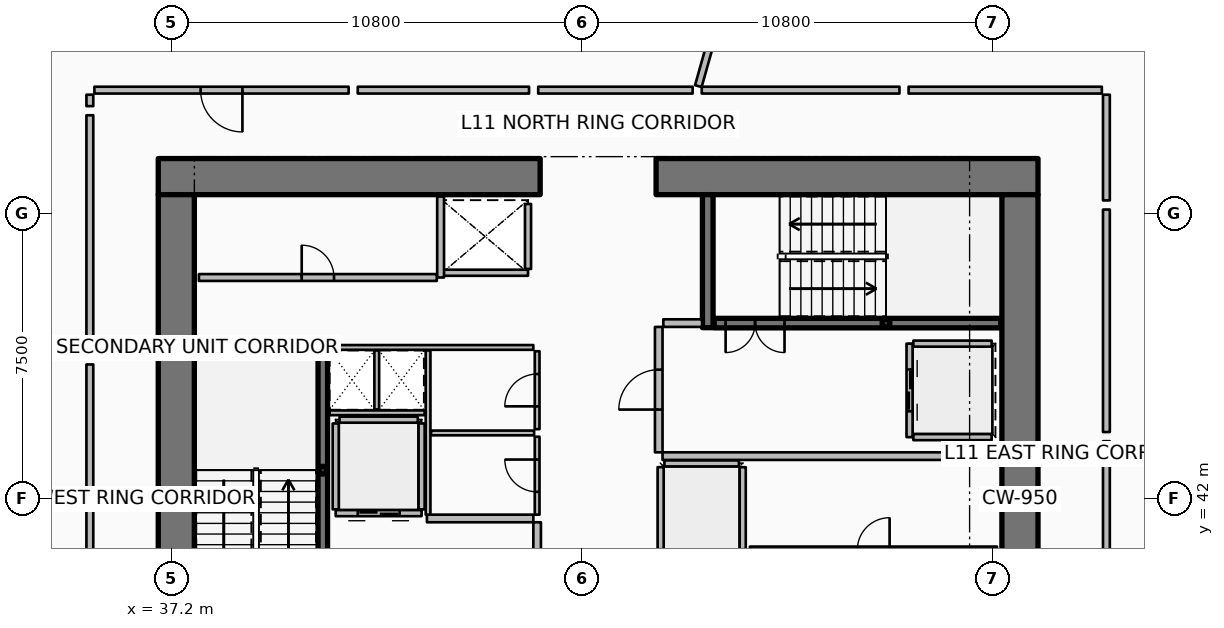
"""IFC4 building model, lengths in metres.
Left out: names, types, materials, properties, quantities, classifications, styles, units other than length and angle.
Written with IfcOpenShell. Run it as: python <this file> out.ifc"""

import sys

from ifc_helpers import new_model, si_unit, direction, frame, frame_2d, origin, origin_2d, place, context, subcontext, project, spatial, rectangle, hollow_rectangle, extrude, element, fill, save


model = new_model("IFC4")
c1 = context("Model", 3, precision=1e-05, world=origin(), true_north=direction((0.0, 1.0)))
c2 = subcontext(c1, "Body", "Model", "MODEL_VIEW")
j1 = project(units=[si_unit("LENGTHUNIT", "METRE"), si_unit("PLANEANGLEUNIT", "RADIAN")], contexts=[c1])
p1 = place(None, origin())
s1 = spatial("IfcSite", under=j1, at=p1, CompositionType="ELEMENT")
p2 = place(p1, origin())
s2 = spatial("IfcBuilding", under=s1, at=p2, CompositionType="ELEMENT")
p3 = place(p2, frame((0.0, 0.0, 48.9)))
s3 = spatial("IfcBuildingStorey", under=s2, at=p3, CompositionType="ELEMENT", Elevation=48.9)
p4 = place(p3, frame((36.85, 50.475, 0.0), z_axis=(0.0, 0.0, 1.0), x_axis=(1.0, 0.0, 0.0)))
e1 = element("IfcWall", 1, at=p4, inside=s3, PredefinedType="SHEAR", context=c2, shape_type="SweptSolid", body=[
    extrude(rectangle(XDim=10.05, YDim=0.95, at=frame_2d((5.025, 0.0))), origin(), (0.0, 0.0, 1.0), 3.75),
])
p5 = place(p3, frame((49.95, 50.475, 0.0), z_axis=(0.0, 0.0, 1.0), x_axis=(1.0, 0.0, 0.0)))
e2 = element("IfcWall", 2, at=p5, inside=s3, PredefinedType="SHEAR", context=c2, shape_type="SweptSolid", body=[
    extrude(rectangle(XDim=10.05, YDim=0.95, at=frame_2d((5.025, 0.0))), origin(), (0.0, 0.0, 1.0), 3.75),
])
for number, where, z_axis, x_axis in (
    (3, (37.325, 34.0, 0.0), (0.0, 0.0, 1.0), (0.0, 1.0, 0.0)),
    (4, (59.525, 34.0, 0.0), (0.0, 0.0, 1.0), (0.0, 1.0, 0.0)),
):
    element("IfcWall", number, at=place(p3, frame(where, z_axis=z_axis, x_axis=x_axis)), inside=s3, PredefinedType="SHEAR", context=c2, shape_type="SweptSolid", body=[
        extrude(rectangle(XDim=16.0, YDim=0.95, at=frame_2d((8.0, 0.0))), origin(), (0.0, 0.0, 1.0), 3.75),
    ])
for number, where, z_axis, x_axis in (
    (5, (37.8, 45.94, 0.0), (0.0, 0.0, 1.0), (1.0, 0.0, 0.0)),
    (6, (51.31, 46.5, 0.0), (0.0, 0.0, 1.0), (0.0, 1.0, 0.0)),
):
    element("IfcWall", number, at=place(p3, frame(where, z_axis=z_axis, x_axis=x_axis)), inside=s3, PredefinedType="SHEAR", context=c2, shape_type="SweptSolid", body=[
        extrude(rectangle(XDim=3.5, YDim=0.28, at=frame_2d((1.75, 0.0))), origin(), (0.0, 0.0, 1.0), 3.75),
    ])
for number, where, z_axis, x_axis in (
    (7, (41.18, 42.75, 0.0), (0.0, 0.0, 1.0), (1.0, 0.0, 0.0)),
    (8, (56.0, 46.62, 0.0), (0.0, 0.0, 1.0), (1.0, 0.0, 0.0)),
):
    element("IfcColumn", number, at=place(p3, frame(where, z_axis=z_axis, x_axis=x_axis)), inside=s3, PredefinedType="COLUMN", context=c2, shape_type="SweptSolid", body=[
        extrude(hollow_rectangle(XDim=0.2, YDim=0.2, WallThickness=0.01, InnerFilletRadius=0.01, OuterFilletRadius=0.02, at=origin_2d()), origin(), (0.0, 0.0, 1.0), 1.67),
    ])
p6 = place(p3, frame((41.18, 38.22, 0.0), z_axis=(0.0, 0.0, 1.0), x_axis=(0.0, 1.0, 0.0)))
e9 = element("IfcWall", 9, at=p6, inside=s3, PredefinedType="SOLIDWALL", context=c2, shape_type="SweptSolid", body=[
    extrude(rectangle(XDim=7.56, YDim=0.25, at=frame_2d((3.78, 0.0))), origin(), (0.0, 0.0, 1.0), 3.5),
])
p7 = place(p6, frame((0.3, 0.0, 0.0)))
e10 = element("IfcOpeningElement", 10, at=p7, cuts=e9, PredefinedType="OPENING", context=c2, shape_type="SweptSolid", body=[
    extrude(rectangle(XDim=1.55, YDim=2.15, at=frame_2d((0.775, 1.075))), frame((0.0, 0.135, 0.0), z_axis=(0.0, -1.0, 0.0), x_axis=(1.0, 0.0, 0.0)), (0.0, 0.0, 1.0), 0.27),
])
p8 = place(p3, frame((51.48, 46.62, 0.0), z_axis=(0.0, 0.0, 1.0), x_axis=(1.0, 0.0, 0.0)))
e11 = element("IfcWall", 11, at=p8, inside=s3, PredefinedType="SOLIDWALL", context=c2, shape_type="SweptSolid", body=[
    extrude(rectangle(XDim=7.54, YDim=0.25, at=frame_2d((3.77, 0.0))), origin(), (0.0, 0.0, 1.0), 3.5),
])
p9 = place(p8, frame((0.3, 0.0, 0.0)))
e12 = element("IfcOpeningElement", 12, at=p9, cuts=e11, PredefinedType="OPENING", context=c2, shape_type="SweptSolid", body=[
    extrude(rectangle(XDim=1.55, YDim=2.15, at=frame_2d((0.775, 1.075))), frame((0.0, 0.135, 0.0), z_axis=(0.0, -1.0, 0.0), x_axis=(1.0, 0.0, 0.0)), (0.0, 0.0, 1.0), 0.27),
])
p10 = place(p3, frame((46.58, 47.945, 0.0), z_axis=(0.0, 0.0, 1.0), x_axis=(-1.0, 0.0, 0.0)))
e13 = element("IfcWall", 13, at=p10, inside=s3, PredefinedType="PARTITIONING", context=c2, shape_type="SweptSolid", body=[
    extrude(rectangle(XDim=2.26, YDim=0.16, at=frame_2d((1.13, 0.0))), origin(), (0.0, 0.0, 1.0), 3.5),
])
p11 = place(p3, frame((46.58, 48.045, 0.0), z_axis=(0.0, 0.0, 1.0), x_axis=(0.0, 1.0, 0.0)))
e14 = element("IfcWall", 14, at=p11, inside=s3, PredefinedType="PARTITIONING", context=c2, shape_type="SweptSolid", body=[
    extrude(rectangle(XDim=1.71, YDim=0.16, at=frame_2d((0.855, 0.0))), origin(), (0.0, 0.0, 1.0), 3.5),
])
p12 = place(p3, frame((43.78, 41.62, 0.0), z_axis=(0.0, 0.0, 1.0), x_axis=(-1.0, 0.0, 0.0)))
e15 = element("IfcWall", 15, at=p12, inside=s3, PredefinedType="PARTITIONING", context=c2, shape_type="SweptSolid", body=[
    extrude(rectangle(XDim=2.26, YDim=0.16, at=frame_2d((1.13, 0.0))), origin(), (0.0, 0.0, 1.0), 3.5),
])
p13 = place(p12, frame((0.58, 0.0, 0.0)))
e16 = element("IfcOpeningElement", 16, at=p13, cuts=e15, PredefinedType="OPENING", context=c2, shape_type="SweptSolid", body=[
    extrude(rectangle(XDim=1.1, YDim=2.1, at=frame_2d((0.55, 1.05))), frame((0.0, 0.09, 0.0), z_axis=(0.0, -1.0, 0.0), x_axis=(1.0, 0.0, 0.0)), (0.0, 0.0, 1.0), 0.18),
])
for number, where, z_axis, x_axis in (
    (17, (43.78, 41.72, 0.0), (0.0, 0.0, 1.0), (0.0, 1.0, 0.0)),
    (18, (41.52, 41.72, 0.0), (0.0, 0.0, 1.0), (0.0, 1.0, 0.0)),
):
    element("IfcWall", number, at=place(p3, frame(where, z_axis=z_axis, x_axis=x_axis)), inside=s3, PredefinedType="PARTITIONING", context=c2, shape_type="SweptSolid", body=[
        extrude(rectangle(XDim=2.26, YDim=0.16, at=frame_2d((1.13, 0.0))), origin(), (0.0, 0.0, 1.0), 3.5),
    ])
p14 = place(p3, frame((41.62, 44.08, 0.0), z_axis=(0.0, 0.0, 1.0), x_axis=(1.0, 0.0, 0.0)))
e19 = element("IfcWall", 19, at=p14, inside=s3, PredefinedType="PARTITIONING", context=c2, shape_type="SweptSolid", body=[
    extrude(rectangle(XDim=2.06, YDim=0.16, at=frame_2d((1.03, 0.0))), origin(), (0.0, 0.0, 1.0), 3.5),
])
p15 = place(p3, frame((56.62, 46.08, 0.0), z_axis=(0.0, 0.0, 1.0), x_axis=(0.0, -1.0, 0.0)))
e20 = element("IfcWall", 20, at=p15, inside=s3, PredefinedType="PARTITIONING", context=c2, shape_type="SweptSolid", body=[
    extrude(rectangle(XDim=2.46, YDim=0.16, at=frame_2d((1.23, 0.0))), origin(), (0.0, 0.0, 1.0), 3.5),
])
p16 = place(p15, frame((0.68, 0.0, 0.0)))
e21 = element("IfcOpeningElement", 21, at=p16, cuts=e20, PredefinedType="OPENING", context=c2, shape_type="SweptSolid", body=[
    extrude(rectangle(XDim=1.1, YDim=2.1, at=frame_2d((0.55, 1.05))), frame((0.0, 0.09, 0.0), z_axis=(0.0, -1.0, 0.0), x_axis=(1.0, 0.0, 0.0)), (0.0, 0.0, 1.0), 0.18),
])
for number, where, z_axis, x_axis in (
    (22, (56.72, 46.08, 0.0), (0.0, 0.0, 1.0), (1.0, 0.0, 0.0)),
    (23, (56.72, 43.62, 0.0), (0.0, 0.0, 1.0), (1.0, 0.0, 0.0)),
):
    element("IfcWall", number, at=place(p3, frame(where, z_axis=z_axis, x_axis=x_axis)), inside=s3, PredefinedType="PARTITIONING", context=c2, shape_type="SweptSolid", body=[
        extrude(rectangle(XDim=2.06, YDim=0.16, at=frame_2d((1.03, 0.0))), origin(), (0.0, 0.0, 1.0), 3.5),
    ])
for number, where, z_axis, x_axis in (
    (24, (52.23, 40.67, 0.0), (0.0, 0.0, 1.0), (0.0, 1.0, 0.0)),
    (25, (50.07, 40.67, 0.0), (0.0, 0.0, 1.0), (0.0, 1.0, 0.0)),
):
    element("IfcWall", number, at=place(p3, frame(where, z_axis=z_axis, x_axis=x_axis)), inside=s3, PredefinedType="PARTITIONING", context=c2, shape_type="SweptSolid", body=[
        extrude(rectangle(XDim=2.16, YDim=0.16, at=frame_2d((1.08, 0.0))), origin(), (0.0, 0.0, 1.0), 3.5),
    ])
p17 = place(p3, frame((50.17, 42.93, 0.0), z_axis=(0.0, 0.0, 1.0), x_axis=(1.0, 0.0, 0.0)))
e26 = element("IfcWall", 26, at=p17, inside=s3, PredefinedType="PARTITIONING", context=c2, shape_type="SweptSolid", body=[
    extrude(rectangle(XDim=1.96, YDim=0.16, at=frame_2d((0.98, 0.0))), origin(), (0.0, 0.0, 1.0), 3.5),
])
p18 = place(p3, frame((37.92, 47.82, 0.0), z_axis=(0.0, 0.0, 1.0), x_axis=(1.0, 0.0, 0.0)))
e27 = element("IfcWall", 27, at=p18, inside=s3, PredefinedType="PARTITIONING", context=c2, shape_type="SweptSolid", body=[
    extrude(rectangle(XDim=6.26, YDim=0.18, at=frame_2d((3.13, 0.0))), origin(), (0.0, 0.0, 1.0), 3.5),
])
p19 = place(p18, frame((2.705, 0.0, 0.0)))
e28 = element("IfcOpeningElement", 28, at=p19, cuts=e27, PredefinedType="OPENING", context=c2, shape_type="SweptSolid", body=[
    extrude(rectangle(XDim=0.85, YDim=2.06, at=frame_2d((0.425, 1.03))), frame((0.0, 0.1, 0.0), z_axis=(0.0, -1.0, 0.0), x_axis=(1.0, 0.0, 0.0)), (0.0, 0.0, 1.0), 0.2),
])
p20 = place(p3, frame((44.28, 47.82, 0.0), z_axis=(0.0, 0.0, 1.0), x_axis=(0.0, 1.0, 0.0)))
e29 = element("IfcWall", 29, at=p20, inside=s3, PredefinedType="PARTITIONING", context=c2, shape_type="SweptSolid", body=[
    extrude(rectangle(XDim=2.13, YDim=0.18, at=frame_2d((1.065, 0.0))), origin(), (0.0, 0.0, 1.0), 3.5),
])
p21 = place(p3, frame((52.42, 40.65, 0.0), z_axis=(0.0, 0.0, 1.0), x_axis=(1.0, 0.0, 0.0)))
e30 = element("IfcWall", 30, at=p21, inside=s3, PredefinedType="PARTITIONING", context=c2, shape_type="SweptSolid", body=[
    extrude(rectangle(XDim=6.5, YDim=0.18, at=frame_2d((3.25, 0.0))), origin(), (0.0, 0.0, 1.0), 3.5),
])
p22 = place(p21, frame((2.825, 0.0, 0.0)))
e31 = element("IfcOpeningElement", 31, at=p22, cuts=e30, PredefinedType="OPENING", context=c2, shape_type="SweptSolid", body=[
    extrude(rectangle(XDim=0.85, YDim=2.06, at=frame_2d((0.425, 1.03))), frame((0.0, 0.1, 0.0), z_axis=(0.0, -1.0, 0.0), x_axis=(1.0, 0.0, 0.0)), (0.0, 0.0, 1.0), 0.2),
])
p23 = place(p3, frame((43.92, 41.48, 0.0), z_axis=(0.0, 0.0, 1.0), x_axis=(1.0, 0.0, 0.0)))
e32 = element("IfcWall", 32, at=p23, inside=s3, PredefinedType="PARTITIONING", context=c2, shape_type="SweptSolid", body=[
    extrude(rectangle(XDim=2.8, YDim=0.2, at=frame_2d((1.4, 0.0))), origin(), (0.0, 0.0, 1.0), 3.5),
])
p24 = place(p3, frame((46.82, 38.12, 0.0), z_axis=(0.0, 0.0, 1.0), x_axis=(0.0, 1.0, 0.0)))
e33 = element("IfcWall", 33, at=p24, inside=s3, PredefinedType="PARTITIONING", context=c2, shape_type="SweptSolid", body=[
    extrude(rectangle(XDim=3.26, YDim=0.2, at=frame_2d((1.63, 0.0))), origin(), (0.0, 0.0, 1.0), 3.5),
])
p25 = place(p24, frame((1.105, 0.0, 0.0)))
e34 = element("IfcOpeningElement", 34, at=p25, cuts=e33, PredefinedType="OPENING", context=c2, shape_type="SweptSolid", body=[
    extrude(rectangle(XDim=1.05, YDim=2.1, at=frame_2d((0.525, 1.05))), frame((0.0, 0.11, 0.0), z_axis=(0.0, -1.0, 0.0), x_axis=(1.0, 0.0, 0.0)), (0.0, 0.0, 1.0), 0.22),
])
p26 = place(p3, frame((50.12, 43.12, 0.0), z_axis=(0.0, 0.0, 1.0), x_axis=(1.0, 0.0, 0.0)))
e35 = element("IfcWall", 35, at=p26, inside=s3, PredefinedType="PARTITIONING", context=c2, shape_type="SweptSolid", body=[
    extrude(rectangle(XDim=8.88, YDim=0.2, at=frame_2d((4.44, 0.0))), origin(), (0.0, 0.0, 1.0), 3.5),
])
p27 = place(p3, frame((50.14, 46.62, 0.0), z_axis=(0.0, 0.0, 1.0), x_axis=(1.0, 0.0, 0.0)))
e36 = element("IfcWall", 36, at=p27, inside=s3, PredefinedType="PARTITIONING", context=c2, shape_type="SweptSolid", body=[
    extrude(rectangle(XDim=1.02, YDim=0.2, at=frame_2d((0.51, 0.0))), origin(), (0.0, 0.0, 1.0), 3.5),
])
p28 = place(p3, frame((50.02, 43.22, 0.0), z_axis=(0.0, 0.0, 1.0), x_axis=(0.0, 1.0, 0.0)))
e37 = element("IfcWall", 37, at=p28, inside=s3, PredefinedType="PARTITIONING", context=c2, shape_type="SweptSolid", body=[
    extrude(rectangle(XDim=3.3, YDim=0.2, at=frame_2d((1.65, 0.0))), origin(), (0.0, 0.0, 1.0), 3.5),
])
p29 = place(p28, frame((1.125, 0.0, 0.0)))
e38 = element("IfcOpeningElement", 38, at=p29, cuts=e37, PredefinedType="OPENING", context=c2, shape_type="SweptSolid", body=[
    extrude(rectangle(XDim=1.05, YDim=2.1, at=frame_2d((0.525, 1.05))), frame((0.0, 0.11, 0.0), z_axis=(0.0, -1.0, 0.0), x_axis=(1.0, 0.0, 0.0)), (0.0, 0.0, 1.0), 0.22),
])
p30 = place(p3, frame((41.36, 45.98, 0.0), z_axis=(0.0, 0.0, 1.0), x_axis=(1.0, 0.0, 0.0)))
e39 = element("IfcWall", 39, at=p30, inside=s3, PredefinedType="PARTITIONING", context=c2, shape_type="SweptSolid", body=[
    extrude(rectangle(XDim=5.36, YDim=0.125, at=frame_2d((2.68, 0.0))), origin(), (0.0, 0.0, 1.0), 2.94),
])
p31 = place(p3, frame((41.36, 44.26, 0.0), z_axis=(0.0, 0.0, 1.0), x_axis=(1.0, 0.0, 0.0)))
e40 = element("IfcWall", 40, at=p31, inside=s3, PredefinedType="PARTITIONING", context=c2, shape_type="SweptSolid", body=[
    extrude(rectangle(XDim=2.5, YDim=0.125, at=frame_2d((1.25, 0.0))), origin(), (0.0, 0.0, 1.0), 2.94),
])
p32 = place(p3, frame((42.6, 44.35, 0.0), z_axis=(0.0, 0.0, 1.0), x_axis=(0.0, 1.0, 0.0)))
e41 = element("IfcWall", 41, at=p32, inside=s3, PredefinedType="PARTITIONING", context=c2, shape_type="SweptSolid", body=[
    extrude(rectangle(XDim=1.55, YDim=0.125, at=frame_2d((0.775, 0.0))), origin(), (0.0, 0.0, 1.0), 2.94),
])
p33 = place(p3, frame((43.95, 41.58, 0.0), z_axis=(0.0, 0.0, 1.0), x_axis=(0.0, 1.0, 0.0)))
e42 = element("IfcWall", 42, at=p33, inside=s3, PredefinedType="PARTITIONING", context=c2, shape_type="SweptSolid", body=[
    extrude(rectangle(XDim=4.32, YDim=0.125, at=frame_2d((2.16, 0.0))), origin(), (0.0, 0.0, 1.0), 2.94),
])
p34 = place(p3, frame((44.03, 43.73, 0.0), z_axis=(0.0, 0.0, 1.0), x_axis=(1.0, 0.0, 0.0)))
e43 = element("IfcWall", 43, at=p34, inside=s3, PredefinedType="PARTITIONING", context=c2, shape_type="SweptSolid", body=[
    extrude(rectangle(XDim=2.71, YDim=0.125, at=frame_2d((1.355, 0.0))), origin(), (0.0, 0.0, 1.0), 2.94),
])
p35 = place(p3, frame((46.82, 41.58, 0.0), z_axis=(0.0, 0.0, 1.0), x_axis=(0.0, 1.0, 0.0)))
e44 = element("IfcWall", 44, at=p35, inside=s3, PredefinedType="PARTITIONING", context=c2, shape_type="SweptSolid", body=[
    extrude(rectangle(XDim=2.05, YDim=0.125, at=frame_2d((1.025, 0.0))), origin(), (0.0, 0.0, 1.0), 2.94),
])
p36 = place(p35, frame((0.6, 0.0, 0.0)))
e45 = element("IfcOpeningElement", 45, at=p36, cuts=e44, PredefinedType="OPENING", context=c2, shape_type="SweptSolid", body=[
    extrude(rectangle(XDim=0.85, YDim=2.06, at=frame_2d((0.425, 1.03))), frame((0.0, 0.073, 0.0), z_axis=(0.0, -1.0, 0.0), x_axis=(1.0, 0.0, 0.0)), (0.0, 0.0, 1.0), 0.145),
])
p37 = place(p3, frame((46.82, 43.83, 0.0), z_axis=(0.0, 0.0, 1.0), x_axis=(0.0, 1.0, 0.0)))
e46 = element("IfcWall", 46, at=p37, inside=s3, PredefinedType="PARTITIONING", context=c2, shape_type="SweptSolid", body=[
    extrude(rectangle(XDim=2.05, YDim=0.125, at=frame_2d((1.025, 0.0))), origin(), (0.0, 0.0, 1.0), 2.94),
])
p38 = place(p37, frame((0.6, 0.0, 0.0)))
e47 = element("IfcOpeningElement", 47, at=p38, cuts=e46, PredefinedType="OPENING", context=c2, shape_type="SweptSolid", body=[
    extrude(rectangle(XDim=0.85, YDim=2.06, at=frame_2d((0.425, 1.03))), frame((0.0, 0.073, 0.0), z_axis=(0.0, -1.0, 0.0), x_axis=(1.0, 0.0, 0.0)), (0.0, 0.0, 1.0), 0.145),
])
p39 = place(p3, frame((51.062, 52.856, 0.0), z_axis=(0.0, 0.0, 1.0), x_axis=(0.27143758514, 0.962456044385, 0.0)))
e48 = element("IfcWall", 48, at=p39, inside=s3, PredefinedType="PARTITIONING", context=c2, shape_type="SweptSolid", body=[
    extrude(rectangle(XDim=16.693, YDim=0.18, at=frame_2d((8.346, 0.0))), origin(), (0.0, 0.0, 1.0), 2.867),
])
p40 = place(p3, frame((41.86, 52.75, 0.0), z_axis=(0.0, 0.0, 1.0), x_axis=(-1.0, 0.0, 0.0)))
e49 = element("IfcWall", 49, at=p40, inside=s3, PredefinedType="PARTITIONING", context=c2, shape_type="SweptSolid", body=[
    extrude(rectangle(XDim=6.69, YDim=0.18, at=frame_2d((3.345, 0.0))), origin(), (0.0, 0.0, 1.0), 2.867),
])
p41 = place(p40, frame((2.795, 0.0, 0.0)))
e50 = element("IfcOpeningElement", 50, at=p41, cuts=e49, PredefinedType="OPENING", context=c2, shape_type="SweptSolid", body=[
    extrude(rectangle(XDim=1.1, YDim=2.1, at=frame_2d((0.55, 1.05))), frame((0.0, 0.1, 0.0), z_axis=(0.0, -1.0, 0.0), x_axis=(1.0, 0.0, 0.0)), (0.0, 0.0, 1.0), 0.2),
])
p42 = place(p3, frame((35.05, 52.63, 0.0), z_axis=(0.0, 0.0, 1.0), x_axis=(0.0, -1.0, 0.0)))
e51 = element("IfcWall", 51, at=p42, inside=s3, PredefinedType="PARTITIONING", context=c2, shape_type="SweptSolid", body=[
    extrude(rectangle(XDim=0.301, YDim=0.18, at=frame_2d((0.15, 0.0))), origin(), (0.0, 0.0, 1.0), 2.867),
])
p43 = place(p3, frame((50.912, 52.75, 0.0), z_axis=(0.0, 0.0, 1.0), x_axis=(-1.0, 0.0, 0.0)))
e52 = element("IfcWall", 52, at=p43, inside=s3, PredefinedType="PARTITIONING", context=c2, shape_type="SweptSolid", body=[
    extrude(rectangle(XDim=4.064, YDim=0.18, at=frame_2d((2.032, 0.0))), origin(), (0.0, 0.0, 1.0), 2.867),
])
p44 = place(p3, frame((46.608, 52.75, 0.0), z_axis=(0.0, 0.0, 1.0), x_axis=(-1.0, 0.0, 0.0)))
e53 = element("IfcWall", 53, at=p44, inside=s3, PredefinedType="PARTITIONING", context=c2, shape_type="SweptSolid", body=[
    extrude(rectangle(XDim=4.508, YDim=0.18, at=frame_2d((2.254, 0.0))), origin(), (0.0, 0.0, 1.0), 2.867),
])
p45 = place(p3, frame((35.05, 52.089, 0.0), z_axis=(0.0, 0.0, 1.0), x_axis=(0.0, -1.0, 0.0)))
e54 = element("IfcWall", 54, at=p45, inside=s3, PredefinedType="PARTITIONING", context=c2, shape_type="SweptSolid", body=[
    extrude(rectangle(XDim=6.317, YDim=0.18, at=frame_2d((3.158, 0.0))), origin(), (0.0, 0.0, 1.0), 2.867),
])
p46 = place(p3, frame((35.05, 45.532, 0.0), z_axis=(0.0, 0.0, 1.0), x_axis=(0.0, -1.0, 0.0)))
e55 = element("IfcWall", 55, at=p46, inside=s3, PredefinedType="PARTITIONING", context=c2, shape_type="SweptSolid", body=[
    extrude(rectangle(XDim=4.945, YDim=0.18, at=frame_2d((2.472, 0.0))), origin(), (0.0, 0.0, 1.0), 2.867),
])
p47 = place(p3, frame((61.8, 38.228, 0.0), z_axis=(0.0, 0.0, 1.0), x_axis=(0.0, 1.0, 0.0)))
e56 = element("IfcWall", 56, at=p47, inside=s3, PredefinedType="PARTITIONING", context=c2, shape_type="SweptSolid", body=[
    extrude(rectangle(XDim=5.285, YDim=0.18, at=frame_2d((2.643, 0.0))), origin(), (0.0, 0.0, 1.0), 2.867),
])
p48 = place(p3, frame((61.8, 43.753, 0.0), z_axis=(0.0, 0.0, 1.0), x_axis=(0.0, 1.0, 0.0)))
e57 = element("IfcWall", 57, at=p48, inside=s3, PredefinedType="PARTITIONING", context=c2, shape_type="SweptSolid", body=[
    extrude(rectangle(XDim=5.855, YDim=0.18, at=frame_2d((2.927, 0.0))), origin(), (0.0, 0.0, 1.0), 2.867),
])
p49 = place(p3, frame((61.8, 49.848, 0.0), z_axis=(0.0, 0.0, 1.0), x_axis=(0.0, 1.0, 0.0)))
e58 = element("IfcWall", 58, at=p49, inside=s3, PredefinedType="PARTITIONING", context=c2, shape_type="SweptSolid", body=[
    extrude(rectangle(XDim=2.781, YDim=0.18, at=frame_2d((1.391, 0.0))), origin(), (0.0, 0.0, 1.0), 2.867),
])
p50 = place(p3, frame((61.68, 52.75, 0.0), z_axis=(0.0, 0.0, 1.0), x_axis=(-1.0, 0.0, 0.0)))
e59 = element("IfcWall", 59, at=p50, inside=s3, PredefinedType="PARTITIONING", context=c2, shape_type="SweptSolid", body=[
    extrude(rectangle(XDim=5.085, YDim=0.18, at=frame_2d((2.543, 0.0))), origin(), (0.0, 0.0, 1.0), 2.867),
])
p51 = place(p3, frame((56.354, 52.75, 0.0), z_axis=(0.0, 0.0, 1.0), x_axis=(-1.0, 0.0, 0.0)))
e60 = element("IfcWall", 60, at=p51, inside=s3, PredefinedType="PARTITIONING", context=c2, shape_type="SweptSolid", body=[
    extrude(rectangle(XDim=5.203, YDim=0.18, at=frame_2d((2.601, 0.0))), origin(), (0.0, 0.0, 1.0), 2.867),
])
p52 = place(p9, origin())
e61 = element("IfcDoor", 61, at=p52, inside=s3, OperationType="DOUBLE_DOOR_SINGLE_SWING", PredefinedType="DOOR", context=c2, shape_type="SweptSolid", body=[
    extrude(rectangle(XDim=1.55, YDim=2.15, at=frame_2d((0.775, 1.075))), frame((0.0, 0.025, 0.0), z_axis=(0.0, -1.0, 0.0), x_axis=(1.0, 0.0, 0.0)), (0.0, 0.0, 1.0), 0.05),
])
fill(e12, e61)
p53 = place(p13, origin())
e62 = element("IfcDoor", 62, at=p53, inside=s3, OperationType="DOUBLE_DOOR_SLIDING", PredefinedType="DOOR", context=c2, shape_type="SweptSolid", body=[
    extrude(rectangle(XDim=1.1, YDim=2.1, at=frame_2d((0.55, 1.05))), frame((0.0, 0.025, 0.0), z_axis=(0.0, -1.0, 0.0), x_axis=(1.0, 0.0, 0.0)), (0.0, 0.0, 1.0), 0.05),
])
fill(e16, e62)
p54 = place(p16, origin())
e63 = element("IfcDoor", 63, at=p54, inside=s3, OperationType="DOUBLE_DOOR_SLIDING", PredefinedType="DOOR", context=c2, shape_type="SweptSolid", body=[
    extrude(rectangle(XDim=1.1, YDim=2.1, at=frame_2d((0.55, 1.05))), frame((0.0, 0.025, 0.0), z_axis=(0.0, -1.0, 0.0), x_axis=(1.0, 0.0, 0.0)), (0.0, 0.0, 1.0), 0.05),
])
fill(e21, e63)
p55 = place(p19, origin())
e64 = element("IfcDoor", 64, at=p55, inside=s3, OperationType="SINGLE_SWING_LEFT", PredefinedType="DOOR", context=c2, shape_type="SweptSolid", body=[
    extrude(rectangle(XDim=0.85, YDim=2.06, at=frame_2d((0.425, 1.03))), frame((0.0, 0.025, 0.0), z_axis=(0.0, -1.0, 0.0), x_axis=(1.0, 0.0, 0.0)), (0.0, 0.0, 1.0), 0.05),
])
fill(e28, e64)
p56 = place(p29, origin())
e65 = element("IfcDoor", 65, at=p56, inside=s3, OperationType="SINGLE_SWING_LEFT", PredefinedType="DOOR", context=c2, shape_type="SweptSolid", body=[
    extrude(rectangle(XDim=1.05, YDim=2.1, at=frame_2d((0.525, 1.05))), frame((0.0, 0.025, 0.0), z_axis=(0.0, -1.0, 0.0), x_axis=(1.0, 0.0, 0.0)), (0.0, 0.0, 1.0), 0.05),
])
fill(e38, e65)
p57 = place(p36, origin())
e66 = element("IfcDoor", 66, at=p57, inside=s3, OperationType="SINGLE_SWING_RIGHT", PredefinedType="DOOR", context=c2, shape_type="SweptSolid", body=[
    extrude(rectangle(XDim=0.85, YDim=2.06, at=frame_2d((0.425, 1.03))), frame((0.0, 0.025, 0.0), z_axis=(0.0, -1.0, 0.0), x_axis=(1.0, 0.0, 0.0)), (0.0, 0.0, 1.0), 0.05),
])
fill(e45, e66)
p58 = place(p38, origin())
e67 = element("IfcDoor", 67, at=p58, inside=s3, OperationType="SINGLE_SWING_LEFT", PredefinedType="DOOR", context=c2, shape_type="SweptSolid", body=[
    extrude(rectangle(XDim=0.85, YDim=2.06, at=frame_2d((0.425, 1.03))), frame((0.0, 0.025, 0.0), z_axis=(0.0, -1.0, 0.0), x_axis=(1.0, 0.0, 0.0)), (0.0, 0.0, 1.0), 0.05),
])
fill(e47, e67)
p59 = place(p41, origin())
e68 = element("IfcDoor", 68, at=p59, inside=s3, OperationType="SINGLE_SWING_LEFT", PredefinedType="DOOR", context=c2, shape_type="SweptSolid", body=[
    extrude(rectangle(XDim=1.1, YDim=2.1, at=frame_2d((0.55, 1.05))), frame((0.0, 0.025, 0.0), z_axis=(0.0, -1.0, 0.0), x_axis=(1.0, 0.0, 0.0)), (0.0, 0.0, 1.0), 0.05),
])
fill(e50, e68)
save(model, sys.argv[1])
